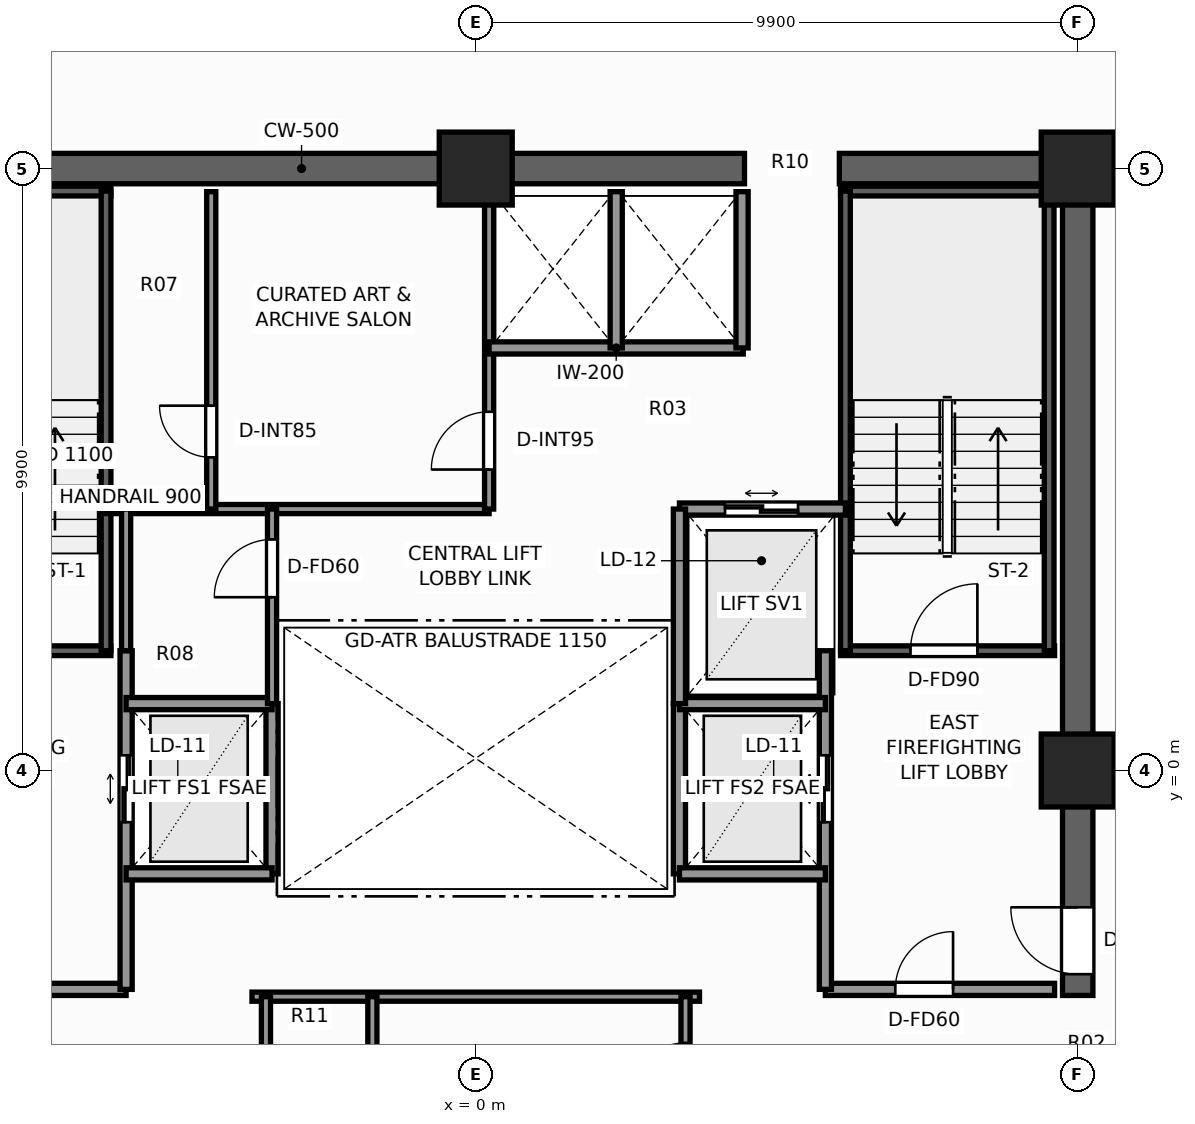
"""IFC4 building model, lengths in metres.
Left out: names, types, materials, properties, quantities, classifications, styles, units other than length and angle.
Written with IfcOpenShell. Run it as: python <this file> out.ifc"""

import sys

from ifc_helpers import new_model, si_unit, direction, frame, frame_2d, origin, origin_2d, place, context, subcontext, project, spatial, rectangle, extrude, element, fill, save


model = new_model("IFC4")
c1 = context("Model", 3, precision=1e-05, world=origin(), true_north=direction((0.0, 1.0)))
c2 = subcontext(c1, "Body", "Model", "MODEL_VIEW")
j1 = project(units=[si_unit("LENGTHUNIT", "METRE"), si_unit("PLANEANGLEUNIT", "RADIAN")], contexts=[c1])
p1 = place(None, origin())
s1 = spatial("IfcSite", under=j1, at=p1, CompositionType="ELEMENT")
p2 = place(p1, origin())
s2 = spatial("IfcBuilding", under=s1, at=p2, CompositionType="ELEMENT")
p3 = place(p2, frame((0.0, 0.0, 186.6)))
s3 = spatial("IfcBuildingStorey", under=s2, at=p3, CompositionType="ELEMENT", Elevation=186.6)
p4 = place(p3, frame((-10.15, 9.9, 0.0), z_axis=(0.0, 0.0, 1.0), x_axis=(1.0, 0.0, 0.0)))
e1 = element("IfcWall", 1, at=p4, inside=s3, PredefinedType="SHEAR", context=c2, shape_type="SweptSolid", body=[
    extrude(rectangle(XDim=14.57, YDim=0.5, at=frame_2d((7.285, 0.0))), origin(), (0.0, 0.0, 1.0), 3.3),
])
p5 = place(p3, frame((5.98, 9.9, 0.0), z_axis=(0.0, 0.0, 1.0), x_axis=(1.0, 0.0, 0.0)))
e2 = element("IfcWall", 2, at=p5, inside=s3, PredefinedType="SHEAR", context=c2, shape_type="SweptSolid", body=[
    extrude(rectangle(XDim=4.17, YDim=0.5, at=frame_2d((2.085, 0.0))), origin(), (0.0, 0.0, 1.0), 3.3),
])
p6 = place(p3, frame((9.9, -3.7, 0.0), z_axis=(0.0, 0.0, 1.0), x_axis=(0.0, 1.0, 0.0)))
e3 = element("IfcWall", 3, at=p6, inside=s3, PredefinedType="SHEAR", context=c2, shape_type="SweptSolid", body=[
    extrude(rectangle(XDim=13.35, YDim=0.5, at=frame_2d((6.675, 0.0))), origin(), (0.0, 0.0, 1.0), 3.3),
])
p7 = place(p6, frame((0.35, 0.0, 0.0)))
e4 = element("IfcOpeningElement", 4, at=p7, cuts=e3, PredefinedType="OPENING", context=c2, shape_type="SweptSolid", body=[
    extrude(rectangle(XDim=1.1, YDim=2.2, at=frame_2d((0.55, 1.1))), frame((0.0, 0.26, 0.0), z_axis=(0.0, -1.0, 0.0), x_axis=(1.0, 0.0, 0.0)), (0.0, 0.0, 1.0), 0.52),
])
for number, where, z_axis, x_axis in (
    (5, (9.9, 9.9, 0.0), (0.0, 0.0, 1.0), (1.0, 0.0, 0.0)),
    (6, (9.9, 0.0, 0.0), (0.0, 0.0, 1.0), (1.0, 0.0, 0.0)),
    (7, (0.0, 9.9, 0.0), (0.0, 0.0, 1.0), (1.0, 0.0, 0.0)),
):
    element("IfcColumn", number, at=place(p3, frame(where, z_axis=z_axis, x_axis=x_axis)), inside=s3, PredefinedType="COLUMN", context=c2, shape_type="SweptSolid", body=[
        extrude(rectangle(XDim=1.2, YDim=1.2, at=origin_2d()), origin(), (0.0, 0.0, 1.0), 3.3),
    ])
p8 = place(p3, frame((-9.52, 1.97, 0.0), z_axis=(0.0, 0.0, 1.0), x_axis=(1.0, 0.0, 0.0)))
e8 = element("IfcWall", 8, at=p8, inside=s3, PredefinedType="SHEAR", context=c2, shape_type="SweptSolid", body=[
    extrude(rectangle(XDim=3.52, YDim=0.16, at=frame_2d((1.76, 0.0))), origin(), (0.0, 0.0, 1.0), 3.3),
])
p9 = place(p8, frame((1.15, 0.0, 0.0)))
e9 = element("IfcOpeningElement", 9, at=p9, cuts=e8, PredefinedType="OPENING", context=c2, shape_type="SweptSolid", body=[
    extrude(rectangle(XDim=1.1, YDim=2.2, at=frame_2d((0.55, 1.1))), frame((0.0, 0.09, 0.0), z_axis=(0.0, -1.0, 0.0), x_axis=(1.0, 0.0, 0.0)), (0.0, 0.0, 1.0), 0.18),
])
p10 = place(p3, frame((-9.52, 9.53, 0.0), z_axis=(0.0, 0.0, 1.0), x_axis=(1.0, 0.0, 0.0)))
e10 = element("IfcWall", 10, at=p10, inside=s3, PredefinedType="SHEAR", context=c2, shape_type="SweptSolid", body=[
    extrude(rectangle(XDim=3.52, YDim=0.16, at=frame_2d((1.76, 0.0))), origin(), (0.0, 0.0, 1.0), 3.3),
])
p11 = place(p3, frame((-6.08, 1.97, 0.0), z_axis=(0.0, 0.0, 1.0), x_axis=(0.0, 1.0, 0.0)))
e11 = element("IfcWall", 11, at=p11, inside=s3, PredefinedType="SHEAR", context=c2, shape_type="SweptSolid", body=[
    extrude(rectangle(XDim=7.56, YDim=0.16, at=frame_2d((3.78, 0.0))), origin(), (0.0, 0.0, 1.0), 3.3),
])
p12 = place(p3, frame((6.0, 1.97, 0.0), z_axis=(0.0, 0.0, 1.0), x_axis=(1.0, 0.0, 0.0)))
e12 = element("IfcWall", 12, at=p12, inside=s3, PredefinedType="SHEAR", context=c2, shape_type="SweptSolid", body=[
    extrude(rectangle(XDim=3.52, YDim=0.16, at=frame_2d((1.76, 0.0))), origin(), (0.0, 0.0, 1.0), 3.3),
])
p13 = place(p12, frame((1.15, 0.0, 0.0)))
e13 = element("IfcOpeningElement", 13, at=p13, cuts=e12, PredefinedType="OPENING", context=c2, shape_type="SweptSolid", body=[
    extrude(rectangle(XDim=1.1, YDim=2.2, at=frame_2d((0.55, 1.1))), frame((0.0, 0.09, 0.0), z_axis=(0.0, -1.0, 0.0), x_axis=(1.0, 0.0, 0.0)), (0.0, 0.0, 1.0), 0.18),
])
p14 = place(p3, frame((6.0, 9.53, 0.0), z_axis=(0.0, 0.0, 1.0), x_axis=(1.0, 0.0, 0.0)))
e14 = element("IfcWall", 14, at=p14, inside=s3, PredefinedType="SHEAR", context=c2, shape_type="SweptSolid", body=[
    extrude(rectangle(XDim=3.52, YDim=0.16, at=frame_2d((1.76, 0.0))), origin(), (0.0, 0.0, 1.0), 3.3),
])
for number, where, z_axis, x_axis in (
    (15, (6.08, 1.97, 0.0), (0.0, 0.0, 1.0), (0.0, 1.0, 0.0)),
    (16, (9.43, 1.97, 0.0), (0.0, 0.0, 1.0), (0.0, 1.0, 0.0)),
):
    element("IfcWall", number, at=place(p3, frame(where, z_axis=z_axis, x_axis=x_axis)), inside=s3, PredefinedType="SHEAR", context=c2, shape_type="SweptSolid", body=[
        extrude(rectangle(XDim=7.56, YDim=0.16, at=frame_2d((3.78, 0.0))), origin(), (0.0, 0.0, 1.0), 3.3),
    ])
p15 = place(p3, frame((-9.52, -3.6, 0.0), z_axis=(0.0, 0.0, 1.0), x_axis=(1.0, 0.0, 0.0)))
e17 = element("IfcWall", 17, at=p15, inside=s3, PredefinedType="SOLIDWALL", context=c2, shape_type="SweptSolid", body=[
    extrude(rectangle(XDim=3.77, YDim=0.2, at=frame_2d((1.885, 0.0))), origin(), (0.0, 0.0, 1.0), 3.08),
])
p16 = place(p15, frame((1.15, 0.0, 0.0)))
e18 = element("IfcOpeningElement", 18, at=p16, cuts=e17, PredefinedType="OPENING", context=c2, shape_type="SweptSolid", body=[
    extrude(rectangle(XDim=0.95, YDim=2.06, at=frame_2d((0.475, 1.03))), frame((0.0, 0.11, 0.0), z_axis=(0.0, -1.0, 0.0), x_axis=(1.0, 0.0, 0.0)), (0.0, 0.0, 1.0), 0.22),
])
p17 = place(p3, frame((-5.75, -3.6, 0.0), z_axis=(0.0, 0.0, 1.0), x_axis=(0.0, 1.0, 0.0)))
e19 = element("IfcWall", 19, at=p17, inside=s3, PredefinedType="SOLIDWALL", context=c2, shape_type="SweptSolid", body=[
    extrude(rectangle(XDim=5.57, YDim=0.2, at=frame_2d((2.785, 0.0))), origin(), (0.0, 0.0, 1.0), 2.715),
])
p18 = place(p17, frame((2.75, 0.0, 0.0)))
e20 = element("IfcOpeningElement", 20, at=p18, cuts=e19, PredefinedType="OPENING", context=c2, shape_type="SweptSolid", body=[
    extrude(rectangle(XDim=1.1, YDim=2.2, at=frame_2d((0.55, 1.1))), frame((0.0, 0.11, 0.0), z_axis=(0.0, -1.0, 0.0), x_axis=(1.0, 0.0, 0.0)), (0.0, 0.0, 1.0), 0.22),
])
p19 = place(p3, frame((-3.35, -1.7, 0.0), z_axis=(0.0, 0.0, 1.0), x_axis=(0.0, 1.0, 0.0)))
e21 = element("IfcWall", 21, at=p19, inside=s3, PredefinedType="SOLIDWALL", context=c2, shape_type="SweptSolid", body=[
    extrude(rectangle(XDim=2.8, YDim=0.2, at=frame_2d((1.4, 0.0))), origin(), (0.0, 0.0, 1.0), 2.715),
])
for number, where, z_axis, x_axis in (
    (22, (-5.75, -1.7, 0.0), (0.0, 0.0, 1.0), (1.0, 0.0, 0.0)),
    (23, (-5.75, 1.1, 0.0), (0.0, 0.0, 1.0), (1.0, 0.0, 0.0)),
):
    element("IfcWall", number, at=place(p3, frame(where, z_axis=z_axis, x_axis=x_axis)), inside=s3, PredefinedType="SOLIDWALL", context=c2, shape_type="SweptSolid", body=[
        extrude(rectangle(XDim=2.4, YDim=0.2, at=frame_2d((1.2, 0.0))), origin(), (0.0, 0.0, 1.0), 3.08),
    ])
p20 = place(p3, frame((5.75, -3.6, 0.0), z_axis=(0.0, 0.0, 1.0), x_axis=(1.0, 0.0, 0.0)))
e24 = element("IfcWall", 24, at=p20, inside=s3, PredefinedType="SOLIDWALL", context=c2, shape_type="SweptSolid", body=[
    extrude(rectangle(XDim=3.77, YDim=0.2, at=frame_2d((1.885, 0.0))), origin(), (0.0, 0.0, 1.0), 3.08),
])
p21 = place(p20, frame((1.15, 0.0, 0.0)))
e25 = element("IfcOpeningElement", 25, at=p21, cuts=e24, PredefinedType="OPENING", context=c2, shape_type="SweptSolid", body=[
    extrude(rectangle(XDim=0.95, YDim=2.06, at=frame_2d((0.475, 1.03))), frame((0.0, 0.11, 0.0), z_axis=(0.0, -1.0, 0.0), x_axis=(1.0, 0.0, 0.0)), (0.0, 0.0, 1.0), 0.22),
])
p22 = place(p3, frame((5.75, -3.6, 0.0), z_axis=(0.0, 0.0, 1.0), x_axis=(0.0, 1.0, 0.0)))
e26 = element("IfcWall", 26, at=p22, inside=s3, PredefinedType="SOLIDWALL", context=c2, shape_type="SweptSolid", body=[
    extrude(rectangle(XDim=5.57, YDim=0.2, at=frame_2d((2.785, 0.0))), origin(), (0.0, 0.0, 1.0), 2.715),
])
p23 = place(p22, frame((2.75, 0.0, 0.0)))
e27 = element("IfcOpeningElement", 27, at=p23, cuts=e26, PredefinedType="OPENING", context=c2, shape_type="SweptSolid", body=[
    extrude(rectangle(XDim=1.1, YDim=2.2, at=frame_2d((0.55, 1.1))), frame((0.0, 0.11, 0.0), z_axis=(0.0, -1.0, 0.0), x_axis=(1.0, 0.0, 0.0)), (0.0, 0.0, 1.0), 0.22),
])
p24 = place(p3, frame((3.35, -1.7, 0.0), z_axis=(0.0, 0.0, 1.0), x_axis=(0.0, 1.0, 0.0)))
e28 = element("IfcWall", 28, at=p24, inside=s3, PredefinedType="SOLIDWALL", context=c2, shape_type="SweptSolid", body=[
    extrude(rectangle(XDim=2.8, YDim=0.2, at=frame_2d((1.4, 0.0))), origin(), (0.0, 0.0, 1.0), 2.715),
])
for number, where, z_axis, x_axis in (
    (29, (3.35, -1.7, 0.0), (0.0, 0.0, 1.0), (1.0, 0.0, 0.0)),
    (30, (3.35, 1.1, 0.0), (0.0, 0.0, 1.0), (1.0, 0.0, 0.0)),
):
    element("IfcWall", number, at=place(p3, frame(where, z_axis=z_axis, x_axis=x_axis)), inside=s3, PredefinedType="SOLIDWALL", context=c2, shape_type="SweptSolid", body=[
        extrude(rectangle(XDim=2.4, YDim=0.2, at=frame_2d((1.2, 0.0))), origin(), (0.0, 0.0, 1.0), 3.08),
    ])
p25 = place(p3, frame((3.35, 4.3, 0.0), z_axis=(0.0, 0.0, 1.0), x_axis=(1.0, 0.0, 0.0)))
e31 = element("IfcWall", 31, at=p25, inside=s3, PredefinedType="SOLIDWALL", context=c2, shape_type="SweptSolid", body=[
    extrude(rectangle(XDim=2.73, YDim=0.2, at=frame_2d((1.365, 0.0))), origin(), (0.0, 0.0, 1.0), 3.08),
])
p26 = place(p25, frame((0.75, 0.0, 0.0)))
e32 = element("IfcOpeningElement", 32, at=p26, cuts=e31, PredefinedType="OPENING", context=c2, shape_type="SweptSolid", body=[
    extrude(rectangle(XDim=1.2, YDim=2.25, at=frame_2d((0.6, 1.125))), frame((0.0, 0.11, 0.0), z_axis=(0.0, -1.0, 0.0), x_axis=(1.0, 0.0, 0.0)), (0.0, 0.0, 1.0), 0.22),
])
p27 = place(p3, frame((3.35, 1.1, 0.0), z_axis=(0.0, 0.0, 1.0), x_axis=(0.0, 1.0, 0.0)))
e33 = element("IfcWall", 33, at=p27, inside=s3, PredefinedType="SOLIDWALL", context=c2, shape_type="SweptSolid", body=[
    extrude(rectangle(XDim=3.2, YDim=0.2, at=frame_2d((1.6, 0.0))), origin(), (0.0, 0.0, 1.0), 2.715),
])
p28 = place(p3, frame((-6.08, 4.3, 0.0), z_axis=(0.0, 0.0, 1.0), x_axis=(1.0, 0.0, 0.0)))
e34 = element("IfcWall", 34, at=p28, inside=s3, PredefinedType="PARTITIONING", context=c2, shape_type="SweptSolid", body=[
    extrude(rectangle(XDim=6.3, YDim=0.15, at=frame_2d((3.15, 0.0))), origin(), (0.0, 0.0, 1.0), 3.08),
])
p29 = place(p3, frame((0.22, 4.3, 0.0), z_axis=(0.0, 0.0, 1.0), x_axis=(0.0, 1.0, 0.0)))
e35 = element("IfcWall", 35, at=p29, inside=s3, PredefinedType="PARTITIONING", context=c2, shape_type="SweptSolid", body=[
    extrude(rectangle(XDim=5.22, YDim=0.15, at=frame_2d((2.61, 0.0))), origin(), (0.0, 0.0, 1.0), 3.08),
])
p30 = place(p29, frame((0.65, 0.0, 0.0)))
e36 = element("IfcOpeningElement", 36, at=p30, cuts=e35, PredefinedType="OPENING", context=c2, shape_type="SweptSolid", body=[
    extrude(rectangle(XDim=0.95, YDim=2.06, at=frame_2d((0.475, 1.03))), frame((0.0, 0.085, 0.0), z_axis=(0.0, -1.0, 0.0), x_axis=(1.0, 0.0, 0.0)), (0.0, 0.0, 1.0), 0.17),
])
p31 = place(p3, frame((-4.35, 4.3, 0.0), z_axis=(0.0, 0.0, 1.0), x_axis=(0.0, 1.0, 0.0)))
e37 = element("IfcWall", 37, at=p31, inside=s3, PredefinedType="PARTITIONING", context=c2, shape_type="SweptSolid", body=[
    extrude(rectangle(XDim=5.22, YDim=0.15, at=frame_2d((2.61, 0.0))), origin(), (0.0, 0.0, 1.0), 3.08),
])
p32 = place(p31, frame((0.85, 0.0, 0.0)))
e38 = element("IfcOpeningElement", 38, at=p32, cuts=e37, PredefinedType="OPENING", context=c2, shape_type="SweptSolid", body=[
    extrude(rectangle(XDim=0.85, YDim=2.03, at=frame_2d((0.425, 1.015))), frame((0.0, 0.085, 0.0), z_axis=(0.0, -1.0, 0.0), x_axis=(1.0, 0.0, 0.0)), (0.0, 0.0, 1.0), 0.17),
])
p33 = place(p3, frame((0.22, 6.95, 0.0), z_axis=(0.0, 0.0, 1.0), x_axis=(1.0, 0.0, 0.0)))
e39 = element("IfcWall", 39, at=p33, inside=s3, PredefinedType="SOLIDWALL", context=c2, shape_type="SweptSolid", body=[
    extrude(rectangle(XDim=4.18, YDim=0.2, at=frame_2d((2.09, 0.0))), origin(), (0.0, 0.0, 1.0), 3.08),
])
for number, where, z_axis, x_axis in (
    (40, (4.38, 6.95, 0.0), (0.0, 0.0, 1.0), (0.0, 1.0, 0.0)),
    (41, (2.31, 6.95, 0.0), (0.0, 0.0, 1.0), (0.0, 1.0, 0.0)),
):
    element("IfcWall", number, at=place(p3, frame(where, z_axis=z_axis, x_axis=x_axis)), inside=s3, PredefinedType="SOLIDWALL", context=c2, shape_type="SweptSolid", body=[
        extrude(rectangle(XDim=2.57, YDim=0.2, at=frame_2d((1.285, 0.0))), origin(), (0.0, 0.0, 1.0), 3.08),
    ])
p34 = place(p3, frame((-3.68, -3.72, 0.0), z_axis=(0.0, 0.0, 1.0), x_axis=(1.0, 0.0, 0.0)))
e42 = element("IfcWall", 42, at=p34, inside=s3, PredefinedType="PARTITIONING", context=c2, shape_type="SweptSolid", body=[
    extrude(rectangle(XDim=7.36, YDim=0.15, at=frame_2d((3.68, 0.0))), origin(), (0.0, 0.0, 1.0), 3.08),
])
p35 = place(p3, frame((3.45, -6.08, 0.0), z_axis=(0.0, 0.0, 1.0), x_axis=(0.0, 1.0, 0.0)))
e43 = element("IfcWall", 43, at=p35, inside=s3, PredefinedType="PARTITIONING", context=c2, shape_type="SweptSolid", body=[
    extrude(rectangle(XDim=2.36, YDim=0.15, at=frame_2d((1.18, 0.0))), origin(), (0.0, 0.0, 1.0), 3.08),
])
p36 = place(p35, frame((0.65, 0.0, 0.0)))
e44 = element("IfcOpeningElement", 44, at=p36, cuts=e43, PredefinedType="OPENING", context=c2, shape_type="SweptSolid", body=[
    extrude(rectangle(XDim=0.95, YDim=2.06, at=frame_2d((0.475, 1.03))), frame((0.0, 0.085, 0.0), z_axis=(0.0, -1.0, 0.0), x_axis=(1.0, 0.0, 0.0)), (0.0, 0.0, 1.0), 0.17),
])
p37 = place(p3, frame((-3.45, -6.08, 0.0), z_axis=(0.0, 0.0, 1.0), x_axis=(0.0, 1.0, 0.0)))
e45 = element("IfcWall", 45, at=p37, inside=s3, PredefinedType="PARTITIONING", context=c2, shape_type="SweptSolid", body=[
    extrude(rectangle(XDim=2.36, YDim=0.15, at=frame_2d((1.18, 0.0))), origin(), (0.0, 0.0, 1.0), 3.08),
])
p38 = place(p3, frame((-1.7, -6.08, 0.0), z_axis=(0.0, 0.0, 1.0), x_axis=(0.0, 1.0, 0.0)))
e46 = element("IfcWall", 46, at=p38, inside=s3, PredefinedType="PARTITIONING", context=c2, shape_type="SweptSolid", body=[
    extrude(rectangle(XDim=2.36, YDim=0.15, at=frame_2d((1.18, 0.0))), origin(), (0.0, 0.0, 1.0), 3.08),
])
p39 = place(p38, frame((0.65, 0.0, 0.0)))
e47 = element("IfcOpeningElement", 47, at=p39, cuts=e46, PredefinedType="OPENING", context=c2, shape_type="SweptSolid", body=[
    extrude(rectangle(XDim=0.9, YDim=2.06, at=frame_2d((0.45, 1.03))), frame((0.0, 0.085, 0.0), z_axis=(0.0, -1.0, 0.0), x_axis=(1.0, 0.0, 0.0)), (0.0, 0.0, 1.0), 0.17),
])
p40 = place(p3, frame((-3.35, 1.1, 0.0), z_axis=(0.0, 0.0, 1.0), x_axis=(0.0, 1.0, 0.0)))
e48 = element("IfcWall", 48, at=p40, inside=s3, PredefinedType="PARTITIONING", context=c2, shape_type="SweptSolid", body=[
    extrude(rectangle(XDim=3.2, YDim=0.15, at=frame_2d((1.6, 0.0))), origin(), (0.0, 0.0, 1.0), 2.715),
])
p41 = place(p40, frame((1.75, 0.0, 0.0)))
e49 = element("IfcOpeningElement", 49, at=p41, cuts=e48, PredefinedType="OPENING", context=c2, shape_type="SweptSolid", body=[
    extrude(rectangle(XDim=0.95, YDim=2.06, at=frame_2d((0.475, 1.03))), frame((0.0, 0.085, 0.0), z_axis=(0.0, -1.0, 0.0), x_axis=(1.0, 0.0, 0.0)), (0.0, 0.0, 1.0), 0.17),
])
p42 = place(p3, frame((-5.75, 1.97, 0.0), z_axis=(0.0, 0.0, 1.0), x_axis=(0.0, 1.0, 0.0)))
e50 = element("IfcWall", 50, at=p42, inside=s3, PredefinedType="PARTITIONING", context=c2, shape_type="SweptSolid", body=[
    extrude(rectangle(XDim=2.33, YDim=0.15, at=frame_2d((1.165, 0.0))), origin(), (0.0, 0.0, 1.0), 2.715),
])
p43 = place(p13, origin())
e51 = element("IfcDoor", 51, at=p43, inside=s3, OperationType="SINGLE_SWING_RIGHT", PredefinedType="DOOR", context=c2, shape_type="SweptSolid", body=[
    extrude(rectangle(XDim=1.1, YDim=2.2, at=frame_2d((0.55, 1.1))), frame((0.0, 0.025, 0.0), z_axis=(0.0, -1.0, 0.0), x_axis=(1.0, 0.0, 0.0)), (0.0, 0.0, 1.0), 0.05),
])
fill(e13, e51)
p44 = place(p18, origin())
e52 = element("IfcDoor", 52, at=p44, inside=s3, OperationType="DOUBLE_DOOR_SLIDING", PredefinedType="DOOR", context=c2, shape_type="SweptSolid", body=[
    extrude(rectangle(XDim=1.1, YDim=2.2, at=frame_2d((0.55, 1.1))), frame((0.0, 0.025, 0.0), z_axis=(0.0, -1.0, 0.0), x_axis=(1.0, 0.0, 0.0)), (0.0, 0.0, 1.0), 0.05),
])
fill(e20, e52)
p45 = place(p7, origin())
e53 = element("IfcDoor", 53, at=p45, inside=s3, OperationType="SINGLE_SWING_RIGHT", PredefinedType="DOOR", context=c2, shape_type="SweptSolid", body=[
    extrude(rectangle(XDim=1.1, YDim=2.2, at=frame_2d((0.55, 1.1))), frame((0.0, 0.025, 0.0), z_axis=(0.0, -1.0, 0.0), x_axis=(1.0, 0.0, 0.0)), (0.0, 0.0, 1.0), 0.05),
])
fill(e4, e53)
p46 = place(p23, origin())
e54 = element("IfcDoor", 54, at=p46, inside=s3, OperationType="DOUBLE_DOOR_SLIDING", PredefinedType="DOOR", context=c2, shape_type="SweptSolid", body=[
    extrude(rectangle(XDim=1.1, YDim=2.2, at=frame_2d((0.55, 1.1))), frame((0.0, 0.025, 0.0), z_axis=(0.0, -1.0, 0.0), x_axis=(1.0, 0.0, 0.0)), (0.0, 0.0, 1.0), 0.05),
])
fill(e27, e54)
p47 = place(p26, origin())
e55 = element("IfcDoor", 55, at=p47, inside=s3, OperationType="DOUBLE_DOOR_SLIDING", PredefinedType="DOOR", context=c2, shape_type="SweptSolid", body=[
    extrude(rectangle(XDim=1.2, YDim=2.25, at=frame_2d((0.6, 1.125))), frame((0.0, 0.025, 0.0), z_axis=(0.0, -1.0, 0.0), x_axis=(1.0, 0.0, 0.0)), (0.0, 0.0, 1.0), 0.05),
])
fill(e32, e55)
p48 = place(p30, origin())
e56 = element("IfcDoor", 56, at=p48, inside=s3, OperationType="SINGLE_SWING_LEFT", PredefinedType="DOOR", context=c2, shape_type="SweptSolid", body=[
    extrude(rectangle(XDim=0.95, YDim=2.06, at=frame_2d((0.475, 1.03))), frame((0.0, 0.025, 0.0), z_axis=(0.0, -1.0, 0.0), x_axis=(1.0, 0.0, 0.0)), (0.0, 0.0, 1.0), 0.05),
])
fill(e36, e56)
p49 = place(p32, origin())
e57 = element("IfcDoor", 57, at=p49, inside=s3, OperationType="SINGLE_SWING_RIGHT", PredefinedType="DOOR", context=c2, shape_type="SweptSolid", body=[
    extrude(rectangle(XDim=0.85, YDim=2.03, at=frame_2d((0.425, 1.015))), frame((0.0, 0.025, 0.0), z_axis=(0.0, -1.0, 0.0), x_axis=(1.0, 0.0, 0.0)), (0.0, 0.0, 1.0), 0.05),
])
fill(e38, e57)
p50 = place(p21, origin())
e58 = element("IfcDoor", 58, at=p50, inside=s3, OperationType="SINGLE_SWING_RIGHT", PredefinedType="DOOR", context=c2, shape_type="SweptSolid", body=[
    extrude(rectangle(XDim=0.95, YDim=2.06, at=frame_2d((0.475, 1.03))), frame((0.0, 0.025, 0.0), z_axis=(0.0, -1.0, 0.0), x_axis=(1.0, 0.0, 0.0)), (0.0, 0.0, 1.0), 0.05),
])
fill(e25, e58)
p51 = place(p36, origin())
e59 = element("IfcDoor", 59, at=p51, inside=s3, OperationType="SINGLE_SWING_LEFT", PredefinedType="DOOR", context=c2, shape_type="SweptSolid", body=[
    extrude(rectangle(XDim=0.95, YDim=2.06, at=frame_2d((0.475, 1.03))), frame((0.0, 0.025, 0.0), z_axis=(0.0, -1.0, 0.0), x_axis=(1.0, 0.0, 0.0)), (0.0, 0.0, 1.0), 0.05),
])
fill(e44, e59)
p52 = place(p41, origin())
e60 = element("IfcDoor", 60, at=p52, inside=s3, OperationType="SINGLE_SWING_LEFT", PredefinedType="DOOR", context=c2, shape_type="SweptSolid", body=[
    extrude(rectangle(XDim=0.95, YDim=2.06, at=frame_2d((0.475, 1.03))), frame((0.0, 0.025, 0.0), z_axis=(0.0, -1.0, 0.0), x_axis=(1.0, 0.0, 0.0)), (0.0, 0.0, 1.0), 0.05),
])
fill(e49, e60)
save(model, sys.argv[1])
